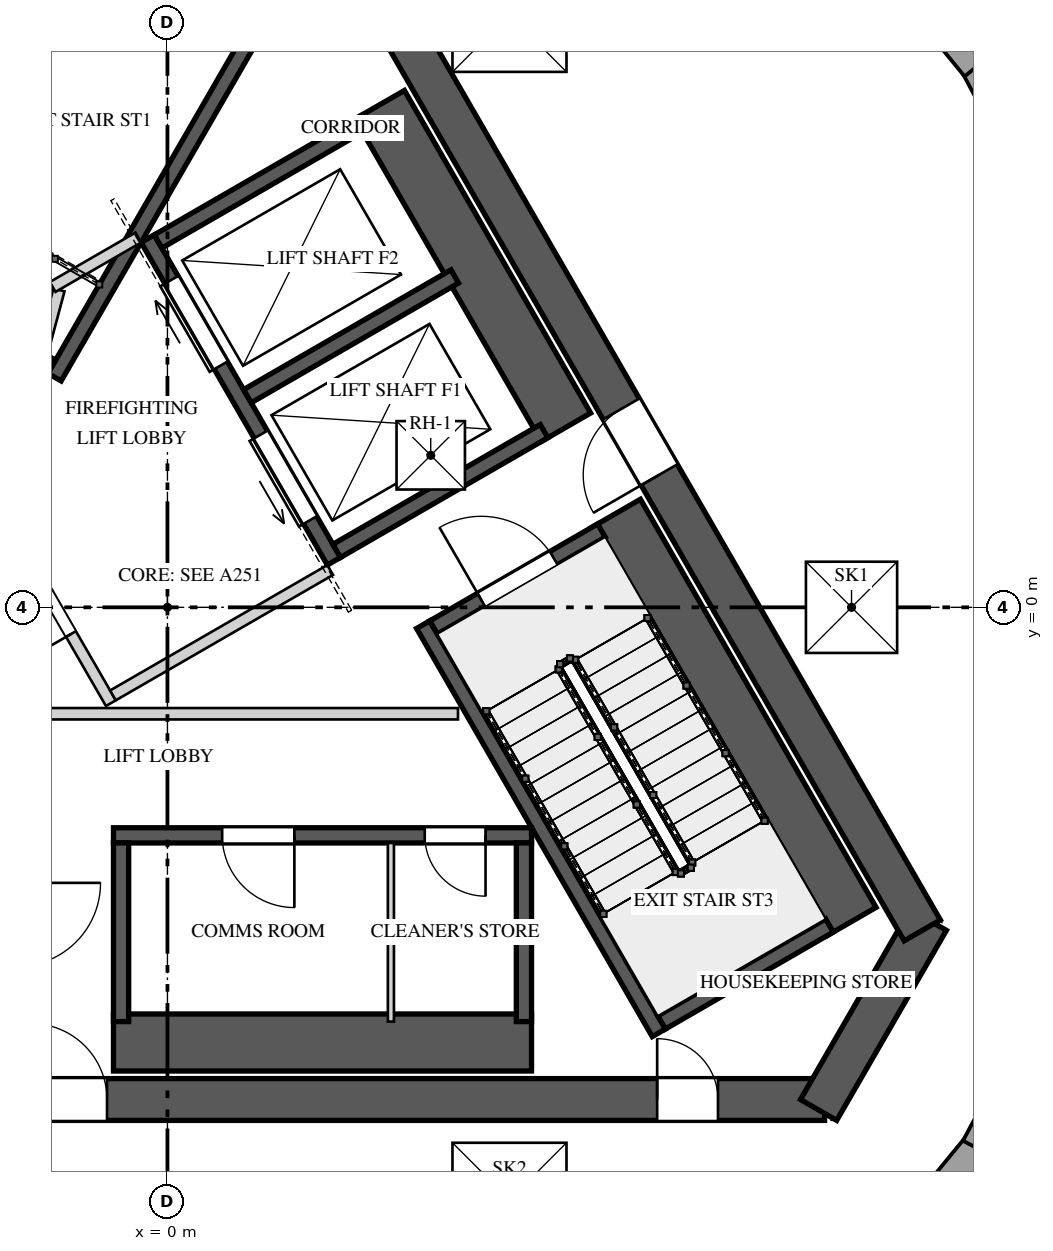
"""IFC4 building model, lengths in metres.
Left out: names, types, materials, properties, quantities, classifications, styles, units other than length and angle.
Written with IfcOpenShell. Run it as: python <this file> out.ifc"""

import sys

from ifc_helpers import new_model, si_unit, direction, frame, frame_2d, origin, origin_2d, place, context, subcontext, project, spatial, rectangle, extrude, element, fill, save


model = new_model("IFC4")
c1 = context("Model", 3, precision=1e-05, world=origin(), true_north=direction((0.0, 1.0)))
c2 = subcontext(c1, "Body", "Model", "MODEL_VIEW")
j1 = project(units=[si_unit("LENGTHUNIT", "METRE"), si_unit("PLANEANGLEUNIT", "RADIAN")], contexts=[c1])
p1 = place(None, origin())
s1 = spatial("IfcSite", under=j1, at=p1, CompositionType="ELEMENT")
p2 = place(p1, origin())
s2 = spatial("IfcBuilding", under=s1, at=p2, CompositionType="ELEMENT")
p3 = place(p2, frame((0.0, 0.0, 380.9)))
s3 = spatial("IfcBuildingStorey", under=s2, at=p3, CompositionType="ELEMENT", Elevation=380.9)
p4 = place(p3, frame((-1.285, 10.725, 0.0), z_axis=(0.0, 0.0, 1.0), x_axis=(-0.499994590896, -0.86602852671, 0.0)))
e1 = element("IfcWall", 1, at=p4, inside=s3, PredefinedType="SHEAR", context=c2, shape_type="SweptSolid", body=[
    extrude(rectangle(XDim=17.292, YDim=0.55, at=frame_2d((8.646, 0.0))), origin(), (0.0, 0.0, 1.0), 11.65),
])
p5 = place(p4, frame((6.851, 0.0, 0.0)))
e2 = element("IfcOpeningElement", 2, at=p5, cuts=e1, PredefinedType="OPENING", context=c2, shape_type="SweptSolid", body=[
    extrude(rectangle(XDim=1.0, YDim=2.4, at=frame_2d((0.5, 1.2))), frame((0.0, 0.285, 0.0), z_axis=(0.0, -1.0, 0.0), x_axis=(1.0, 0.0, 0.0)), (0.0, 0.0, 1.0), 0.57),
])
p6 = place(p3, frame((-8.646, -6.475, 0.0), z_axis=(0.0, 0.0, 1.0), x_axis=(1.0, 0.0, 0.0)))
e3 = element("IfcWall", 3, at=p6, inside=s3, PredefinedType="SHEAR", context=c2, shape_type="SweptSolid", body=[
    extrude(rectangle(XDim=17.292, YDim=0.55, at=frame_2d((8.646, 0.0))), origin(), (0.0, 0.0, 1.0), 11.65),
])
p7 = place(p6, frame((6.851, 0.0, 0.0)))
e4 = element("IfcOpeningElement", 4, at=p7, cuts=e3, PredefinedType="OPENING", context=c2, shape_type="SweptSolid", body=[
    extrude(rectangle(XDim=1.0, YDim=2.4, at=frame_2d((0.5, 1.2))), frame((0.0, 0.285, 0.0), z_axis=(0.0, -1.0, 0.0), x_axis=(1.0, 0.0, 0.0)), (0.0, 0.0, 1.0), 0.57),
])
p8 = place(p6, frame((15.089, 0.0, 0.0)))
e5 = element("IfcOpeningElement", 5, at=p8, cuts=e3, PredefinedType="OPENING", context=c2, shape_type="SweptSolid", body=[
    extrude(rectangle(XDim=0.8, YDim=2.1, at=frame_2d((0.4, 1.05))), frame((0.0, 0.285, 0.0), z_axis=(0.0, -1.0, 0.0), x_axis=(1.0, 0.0, 0.0)), (0.0, 0.0, 1.0), 0.57),
])
p9 = place(p3, frame((8.566, -6.613, 0.0), z_axis=(0.0, 0.0, 1.0), x_axis=(0.499995765644, 0.866027848477, 0.0)))
e6 = element("IfcWall", 6, at=p9, inside=s3, PredefinedType="SHEAR", context=c2, shape_type="SweptSolid", body=[
    extrude(rectangle(XDim=2.887, YDim=0.55, at=frame_2d((1.443, 0.0))), origin(), (0.0, 0.0, 1.0), 11.65),
])
p10 = place(p3, frame((9.93, -4.25, 0.0), z_axis=(0.0, 0.0, 1.0), x_axis=(-0.499994590896, 0.86602852671, 0.0)))
e7 = element("IfcWall", 7, at=p10, inside=s3, PredefinedType="SHEAR", context=c2, shape_type="SweptSolid", body=[
    extrude(rectangle(XDim=17.292, YDim=0.55, at=frame_2d((8.646, 0.0))), origin(), (0.0, 0.0, 1.0), 11.65),
])
p11 = place(p10, frame((6.921, 0.0, 0.0)))
e8 = element("IfcOpeningElement", 8, at=p11, cuts=e7, PredefinedType="OPENING", context=c2, shape_type="SweptSolid", body=[
    extrude(rectangle(XDim=1.0, YDim=2.4, at=frame_2d((0.5, 1.2))), frame((0.0, 0.285, 0.0), z_axis=(0.0, -1.0, 0.0), x_axis=(1.0, 0.0, 0.0)), (0.0, 0.0, 1.0), 0.57),
])
p12 = place(p10, frame((14.626, 0.0, 0.0)))
e9 = element("IfcOpeningElement", 9, at=p12, cuts=e7, PredefinedType="OPENING", context=c2, shape_type="SweptSolid", body=[
    extrude(rectangle(XDim=0.8, YDim=2.1, at=frame_2d((0.4, 1.05))), frame((0.0, 0.285, 0.0), z_axis=(0.0, -1.0, 0.0), x_axis=(1.0, 0.0, 0.0)), (0.0, 0.0, 1.0), 0.57),
])
p13 = place(p3, frame((11.826, 4.898, 0.0), z_axis=(0.0, 0.0, 1.0), x_axis=(-0.47141481613, 0.881911600521, 0.0)))
e10 = element("IfcWall", 10, at=p13, inside=s3, PredefinedType="SOLIDWALL", context=c2, shape_type="SweptSolid", body=[
    extrude(rectangle(XDim=2.529, YDim=0.4, at=frame_2d((1.264, 0.0))), origin(), (0.0, 0.0, 1.0), 11.65),
])
p14 = place(p13, frame((0.665, 0.0, 1.5)))
e11 = element("IfcOpeningElement", 11, at=p14, cuts=e10, PredefinedType="OPENING", context=c2, shape_type="SweptSolid", body=[
    extrude(rectangle(XDim=1.2, YDim=8.0, at=frame_2d((0.6, 4.0))), frame((0.0, 0.21, 0.0), z_axis=(0.0, -1.0, 0.0), x_axis=(1.0, 0.0, 0.0)), (0.0, 0.0, 1.0), 0.42),
])
p15 = place(p3, frame((10.643, 7.111, 0.0), z_axis=(0.0, 0.0, 1.0), x_axis=(-0.634383184074, 0.773018742182, 0.0)))
e12 = element("IfcWall", 12, at=p15, inside=s3, PredefinedType="SOLIDWALL", context=c2, shape_type="SweptSolid", body=[
    extrude(rectangle(XDim=2.529, YDim=0.4, at=frame_2d((1.264, 0.0))), origin(), (0.0, 0.0, 1.0), 11.65),
])
p16 = place(p3, frame((9.051, -9.051, 0.0), z_axis=(0.0, 0.0, 1.0), x_axis=(0.634383184074, 0.773018742182, 0.0)))
e13 = element("IfcWall", 13, at=p16, inside=s3, PredefinedType="SOLIDWALL", context=c2, shape_type="SweptSolid", body=[
    extrude(rectangle(XDim=2.529, YDim=0.4, at=frame_2d((1.264, 0.0))), origin(), (0.0, 0.0, 1.0), 11.65),
])
p17 = place(p16, frame((0.665, 0.0, 1.5)))
e14 = element("IfcOpeningElement", 14, at=p17, cuts=e13, PredefinedType="OPENING", context=c2, shape_type="SweptSolid", body=[
    extrude(rectangle(XDim=1.2, YDim=5.0, at=frame_2d((0.6, 2.5))), frame((0.0, 0.21, 0.0), z_axis=(0.0, -1.0, 0.0), x_axis=(1.0, 0.0, 0.0)), (0.0, 0.0, 1.0), 0.42),
])
p18 = place(p3, frame((10.643, -7.111, 0.0), z_axis=(0.0, 0.0, 1.0), x_axis=(0.47137468207, 0.881933052507, 0.0)))
e15 = element("IfcWall", 15, at=p18, inside=s3, PredefinedType="SOLIDWALL", context=c2, shape_type="SweptSolid", body=[
    extrude(rectangle(XDim=2.529, YDim=0.4, at=frame_2d((1.265, 0.0))), origin(), (0.0, 0.0, 1.0), 11.65),
])
p19 = place(p3, frame((-24.801, 5.463, 0.0), z_axis=(0.0, 0.0, 1.0), x_axis=(0.669133322061, -0.74314238024, 0.0)))
e16 = element("IfcWall", 16, at=p19, inside=s3, PredefinedType="PARAPET", context=c2, shape_type="SweptSolid", body=[
    extrude(rectangle(XDim=41.439, YDim=0.45, at=frame_2d((20.72, 0.0))), origin(), (0.0, 0.0, 1.0), 1.2),
])
p20 = place(p3, frame((7.669, -24.209, 0.0), z_axis=(0.0, 0.0, 1.0), x_axis=(0.309016265785, 0.951056753028, 0.0)))
e17 = element("IfcWall", 17, at=p20, inside=s3, PredefinedType="PARAPET", context=c2, shape_type="SweptSolid", body=[
    extrude(rectangle(XDim=41.439, YDim=0.45, at=frame_2d((20.72, 0.0))), origin(), (0.0, 0.0, 1.0), 1.2),
])
p21 = place(p3, frame((-0.918, 9.86, 0.0), z_axis=(0.0, 0.0, 1.0), x_axis=(-0.500026960575, -0.86600983753, 0.0)))
e18 = element("IfcWall", 18, at=p21, inside=s3, PredefinedType="SOLIDWALL", context=c2, shape_type="SweptSolid", body=[
    extrude(rectangle(XDim=6.2, YDim=0.75, at=frame_2d((3.1, 0.0))), origin(), (0.0, 0.0, 1.0), 11.65),
])
p22 = place(p3, frame((1.615, 8.397, 0.0), z_axis=(0.0, 0.0, 1.0), x_axis=(-0.500009909098, -0.866019682689, 0.0)))
e19 = element("IfcWall", 19, at=p22, inside=s3, PredefinedType="SOLIDWALL", context=c2, shape_type="SweptSolid", body=[
    extrude(rectangle(XDim=6.2, YDim=0.2, at=frame_2d((3.1, 0.0))), origin(), (0.0, 0.0, 1.0), 11.65),
])
p23 = place(p3, frame((-1.521, 3.165, 0.0), z_axis=(0.0, 0.0, 1.0), x_axis=(-0.866030925526, 0.499990435942, 0.0)))
e20 = element("IfcWall", 20, at=p23, inside=s3, PredefinedType="SOLIDWALL", context=c2, shape_type="SweptSolid", body=[
    extrude(rectangle(XDim=2.55, YDim=0.2, at=frame_2d((1.275, 0.0))), origin(), (0.0, 0.0, 1.0), 11.65),
])
p24 = place(p23, frame((0.725, 0.0, 0.0)))
e21 = element("IfcOpeningElement", 21, at=p24, cuts=e20, PredefinedType="OPENING", context=c2, shape_type="SweptSolid", body=[
    extrude(rectangle(XDim=1.1, YDim=2.4, at=frame_2d((0.55, 1.2))), frame((0.0, 0.11, 0.0), z_axis=(0.0, -1.0, 0.0), x_axis=(1.0, 0.0, 0.0)), (0.0, 0.0, 1.0), 0.22),
])
p25 = place(p3, frame((8.998, -4.135, 0.0), z_axis=(0.0, 0.0, 1.0), x_axis=(-0.500009909098, 0.866019682689, 0.0)))
e22 = element("IfcWall", 22, at=p25, inside=s3, PredefinedType="SOLIDWALL", context=c2, shape_type="SweptSolid", body=[
    extrude(rectangle(XDim=6.2, YDim=0.75, at=frame_2d((3.1, 0.0))), origin(), (0.0, 0.0, 1.0), 11.65),
])
p26 = place(p3, frame((6.465, -5.597, 0.0), z_axis=(0.0, 0.0, 1.0), x_axis=(-0.49998037582, 0.866036733513, 0.0)))
e23 = element("IfcWall", 23, at=p26, inside=s3, PredefinedType="SOLIDWALL", context=c2, shape_type="SweptSolid", body=[
    extrude(rectangle(XDim=6.2, YDim=0.2, at=frame_2d((3.1, 0.0))), origin(), (0.0, 0.0, 1.0), 11.65),
])
p27 = place(p3, frame((6.501, -5.461, 0.0), z_axis=(0.0, 0.0, 1.0), x_axis=(0.865989465428, 0.500062241894, 0.0)))
e24 = element("IfcWall", 24, at=p27, inside=s3, PredefinedType="SOLIDWALL", context=c2, shape_type="SweptSolid", body=[
    extrude(rectangle(XDim=2.55, YDim=0.2, at=frame_2d((1.275, 0.0))), origin(), (0.0, 0.0, 1.0), 11.65),
])
p28 = place(p3, frame((3.501, -0.265, 0.0), z_axis=(0.0, 0.0, 1.0), x_axis=(0.866030925526, 0.499990435942, 0.0)))
e25 = element("IfcWall", 25, at=p28, inside=s3, PredefinedType="SOLIDWALL", context=c2, shape_type="SweptSolid", body=[
    extrude(rectangle(XDim=2.55, YDim=0.2, at=frame_2d((1.275, 0.0))), origin(), (0.0, 0.0, 1.0), 11.65),
])
p29 = place(p28, frame((0.725, 0.0, 0.0)))
e26 = element("IfcOpeningElement", 26, at=p29, cuts=e25, PredefinedType="OPENING", context=c2, shape_type="SweptSolid", body=[
    extrude(rectangle(XDim=1.1, YDim=2.4, at=frame_2d((0.55, 1.2))), frame((0.0, 0.11, 0.0), z_axis=(0.0, -1.0, 0.0), x_axis=(1.0, 0.0, 0.0)), (0.0, 0.0, 1.0), 0.22),
])
p30 = place(p3, frame((4.79, -3.0, 0.0), z_axis=(0.0, 0.0, 1.0), x_axis=(-1.0, 0.0, 0.0)))
e27 = element("IfcWall", 27, at=p30, inside=s3, PredefinedType="SOLIDWALL", context=c2, shape_type="SweptSolid", body=[
    extrude(rectangle(XDim=5.5, YDim=0.2, at=frame_2d((2.75, 0.0))), origin(), (0.0, 0.0, 1.0), 11.65),
])
p31 = place(p30, frame((3.12, 0.0, 0.0)))
e28 = element("IfcOpeningElement", 28, at=p31, cuts=e27, PredefinedType="OPENING", context=c2, shape_type="SweptSolid", body=[
    extrude(rectangle(XDim=0.95, YDim=2.4, at=frame_2d((0.475, 1.2))), frame((0.0, 0.11, 0.0), z_axis=(0.0, -1.0, 0.0), x_axis=(1.0, 0.0, 0.0)), (0.0, 0.0, 1.0), 0.22),
])
p32 = place(p30, frame((0.605, 0.0, 0.0)))
e29 = element("IfcOpeningElement", 29, at=p32, cuts=e27, PredefinedType="OPENING", context=c2, shape_type="SweptSolid", body=[
    extrude(rectangle(XDim=0.8, YDim=2.1, at=frame_2d((0.4, 1.05))), frame((0.0, 0.11, 0.0), z_axis=(0.0, -1.0, 0.0), x_axis=(1.0, 0.0, 0.0)), (0.0, 0.0, 1.0), 0.22),
])
p33 = place(p3, frame((-0.71, -5.725, 0.0), z_axis=(0.0, 0.0, 1.0), x_axis=(1.0, 0.0, 0.0)))
e30 = element("IfcWall", 30, at=p33, inside=s3, PredefinedType="SOLIDWALL", context=c2, shape_type="SweptSolid", body=[
    extrude(rectangle(XDim=5.5, YDim=0.75, at=frame_2d((2.75, 0.0))), origin(), (0.0, 0.0, 1.0), 11.65),
])
for number, where, z_axis, x_axis in (
    (31, (-0.61, -3.1, 0.0), (0.0, 0.0, 1.0), (0.0, -1.0, 0.0)),
    (32, (4.69, -3.1, 0.0), (0.0, 0.0, 1.0), (0.0, -1.0, 0.0)),
):
    element("IfcWall", number, at=place(p3, frame(where, z_axis=z_axis, x_axis=x_axis)), inside=s3, PredefinedType="SOLIDWALL", context=c2, shape_type="SweptSolid", body=[
        extrude(rectangle(XDim=2.35, YDim=0.2, at=frame_2d((1.175, 0.0))), origin(), (0.0, 0.0, 1.0), 11.65),
    ])
p34 = place(p3, frame((2.94, -3.1, 0.0), z_axis=(0.0, 0.0, 1.0), x_axis=(0.0, -1.0, 0.0)))
e33 = element("IfcWall", 33, at=p34, inside=s3, PredefinedType="PARTITIONING", context=c2, shape_type="SweptSolid", body=[
    extrude(rectangle(XDim=2.35, YDim=0.08, at=frame_2d((1.175, 0.0))), origin(), (0.0, 0.0, 1.0), 11.65),
])
p35 = place(p3, frame((2.19, 0.606, 0.0), z_axis=(0.0, 0.0, 1.0), x_axis=(-0.500002801628, 0.866023786258, 0.0)))
e34 = element("IfcWall", 34, at=p35, inside=s3, PredefinedType="SOLIDWALL", context=c2, shape_type="SweptSolid", body=[
    extrude(rectangle(XDim=4.9, YDim=0.2, at=frame_2d((2.45, 0.0))), origin(), (0.0, 0.0, 1.0), 11.65),
])
p36 = place(p35, frame((0.625, 0.0, 0.0)))
e35 = element("IfcOpeningElement", 35, at=p36, cuts=e34, PredefinedType="OPENING", context=c2, shape_type="SweptSolid", body=[
    extrude(rectangle(XDim=1.3, YDim=2.1, at=frame_2d((0.65, 1.05))), frame((0.0, 0.11, 0.0), z_axis=(0.0, -1.0, 0.0), x_axis=(1.0, 0.0, 0.0)), (0.0, 0.0, 1.0), 0.22),
])
p37 = place(p35, frame((2.975, 0.0, 0.0)))
e36 = element("IfcOpeningElement", 36, at=p37, cuts=e34, PredefinedType="OPENING", context=c2, shape_type="SweptSolid", body=[
    extrude(rectangle(XDim=1.3, YDim=2.1, at=frame_2d((0.65, 1.05))), frame((0.0, 0.11, 0.0), z_axis=(0.0, -1.0, 0.0), x_axis=(1.0, 0.0, 0.0)), (0.0, 0.0, 1.0), 0.22),
])
p38 = place(p3, frame((5.243, 2.369, 0.0), z_axis=(0.0, 0.0, 1.0), x_axis=(-0.500002801628, 0.866023786258, 0.0)))
e37 = element("IfcWall", 37, at=p38, inside=s3, PredefinedType="SOLIDWALL", context=c2, shape_type="SweptSolid", body=[
    extrude(rectangle(XDim=4.9, YDim=0.75, at=frame_2d((2.45, 0.0))), origin(), (0.0, 0.0, 1.0), 11.65),
])
for number, where, z_axis, x_axis in (
    (38, (2.227, 0.743, 0.0), (0.0, 0.0, 1.0), (0.866, 0.5, 0.0)),
    (39, (1.052, 2.778, 0.0), (0.0, 0.0, 1.0), (0.866, 0.5, 0.0)),
    (40, (-0.123, 4.813, 0.0), (0.0, 0.0, 1.0), (0.866, 0.5, 0.0)),
):
    element("IfcWall", number, at=place(p3, frame(where, z_axis=z_axis, x_axis=x_axis)), inside=s3, PredefinedType="SOLIDWALL", context=c2, shape_type="SweptSolid", body=[
        extrude(rectangle(XDim=3.15, YDim=0.2, at=frame_2d((1.575, 0.0))), origin(), (0.0, 0.0, 1.0), 11.65),
    ])
p39 = place(p3, frame((-0.744, -1.261, 0.0), z_axis=(0.0, 0.0, 1.0), x_axis=(-0.500004234368, 0.866022959057, 0.0)))
e41 = element("IfcWall", 41, at=p39, inside=s3, PredefinedType="PARTITIONING", context=c2, shape_type="SweptSolid", body=[
    extrude(rectangle(XDim=3.125, YDim=0.15, at=frame_2d((1.562, 0.0))), origin(), (0.0, 0.0, 1.0), 11.65),
])
p40 = place(p39, frame((1.05, 0.0, 0.0)))
e42 = element("IfcOpeningElement", 42, at=p40, cuts=e41, PredefinedType="OPENING", context=c2, shape_type="SweptSolid", body=[
    extrude(rectangle(XDim=1.1, YDim=2.4, at=frame_2d((0.55, 1.2))), frame((0.0, 0.085, 0.0), z_axis=(0.0, -1.0, 0.0), x_axis=(1.0, 0.0, 0.0)), (0.0, 0.0, 1.0), 0.17),
])
p41 = place(p3, frame((-0.717, -1.159, 0.0), z_axis=(0.0, 0.0, 1.0), x_axis=(0.866008176907, 0.50002983664, 0.0)))
e43 = element("IfcWall", 43, at=p41, inside=s3, PredefinedType="PARTITIONING", context=c2, shape_type="SweptSolid", body=[
    extrude(rectangle(XDim=3.3, YDim=0.15, at=frame_2d((1.65, 0.0))), origin(), (0.0, 0.0, 1.0), 11.65),
])
p42 = place(p3, frame((-2.178, 1.372, 0.0), z_axis=(0.0, 0.0, 1.0), x_axis=(0.258808958833, 0.96592852884, 0.0)))
e44 = element("IfcWall", 44, at=p42, inside=s3, PredefinedType="PARTITIONING", context=c2, shape_type="SweptSolid", body=[
    extrude(rectangle(XDim=2.903, YDim=0.15, at=frame_2d((1.451, 0.0))), origin(), (0.0, 0.0, 1.0), 11.65),
])
p43 = place(p3, frame((-1.51, 4.215, 0.0), z_axis=(0.0, 0.0, 1.0), x_axis=(0.866085525409, 0.49989585183, 0.0)))
e45 = element("IfcWall", 45, at=p43, inside=s3, PredefinedType="PARTITIONING", context=c2, shape_type="SweptSolid", body=[
    extrude(rectangle(XDim=1.3, YDim=0.15, at=frame_2d((0.65, 0.0))), origin(), (0.0, 0.0, 1.0), 11.65),
])
p44 = place(p3, frame((-4.053, -1.4, 0.0), z_axis=(0.0, 0.0, 1.0), x_axis=(1.0, 0.0, 0.0)))
e46 = element("IfcWall", 46, at=p44, inside=s3, PredefinedType="PARTITIONING", context=c2, shape_type="SweptSolid", body=[
    extrude(rectangle(XDim=7.876, YDim=0.15, at=frame_2d((3.938, 0.0))), origin(), (0.0, 0.0, 1.0), 11.65),
])
p45 = place(p2, frame((0.0, 0.0, 392.9)))
p46 = place(p45, frame((-1.23, -2.9, 0.0), z_axis=(0.0, 0.0, 1.0), x_axis=(0.0, -1.0, 0.0)))
p47 = place(p46, frame((0.675, 0.0, 0.0)))
p48 = place(p47, origin())
e47 = element("IfcDoor", 47, at=p48, inside=s3, OperationType="DOUBLE_DOOR_SINGLE_SWING", PredefinedType="DOOR", context=c2, shape_type="SweptSolid", body=[
    extrude(rectangle(XDim=1.2, YDim=2.1, at=frame_2d((0.6, 1.05))), frame((0.0, 0.025, 0.0), z_axis=(0.0, -1.0, 0.0), x_axis=(1.0, 0.0, 0.0)), (0.0, 0.0, 1.0), 0.05),
])
p49 = place(p45, frame((3.126, 0.385, 0.0), z_axis=(0.0, 0.0, 1.0), x_axis=(0.866030925526, 0.499990435942, 0.0)))
p50 = place(p49, frame((0.675, 0.0, 0.0)))
p51 = place(p50, origin())
e48 = element("IfcDoor", 48, at=p51, inside=s3, OperationType="DOUBLE_DOOR_SINGLE_SWING", PredefinedType="DOOR", context=c2, shape_type="SweptSolid", body=[
    extrude(rectangle(XDim=1.2, YDim=2.1, at=frame_2d((0.6, 1.05))), frame((0.0, 0.025, 0.0), z_axis=(0.0, -1.0, 0.0), x_axis=(1.0, 0.0, 0.0)), (0.0, 0.0, 1.0), 0.05),
])
p52 = place(p45, frame((0.0, 0.0, -0.35)))
p53 = place(p52, frame((9.0, 0.0, 0.0)))
p54 = place(p53, frame((0.0, 0.0, 0.3)))
e49 = element("IfcWindow", 49, at=p54, inside=s3, PartitioningType="SINGLE_PANEL", PredefinedType="SKYLIGHT", context=c2, shape_type="SweptSolid", body=[
    extrude(rectangle(XDim=1.2, YDim=1.2, at=origin_2d()), origin(), (0.0, 0.0, 1.0), 0.05),
])
p55 = place(p52, frame((4.5, 7.794, 0.0)))
p56 = place(p55, frame((0.0, 0.0, 0.3)))
e50 = element("IfcWindow", 50, at=p56, inside=s3, PartitioningType="SINGLE_PANEL", PredefinedType="SKYLIGHT", context=c2, shape_type="SweptSolid", body=[
    extrude(rectangle(XDim=1.5, YDim=1.5, at=origin_2d()), origin(), (0.0, 0.0, 1.0), 0.05),
])
p57 = place(p52, frame((4.5, -7.794, 0.0)))
p58 = place(p57, frame((0.0, 0.0, 0.3)))
e51 = element("IfcWindow", 51, at=p58, inside=s3, PartitioningType="SINGLE_PANEL", PredefinedType="SKYLIGHT", context=c2, shape_type="SweptSolid", body=[
    extrude(rectangle(XDim=1.5, YDim=1.5, at=origin_2d()), origin(), (0.0, 0.0, 1.0), 0.05),
])
p59 = place(p52, frame((3.464, 2.0, 0.0)))
p60 = place(p59, frame((0.0, 0.0, 0.35)))
e52 = element("IfcDoor", 52, at=p60, inside=s3, OperationType="SINGLE_SWING_LEFT", PredefinedType="TRAPDOOR", context=c2, shape_type="SweptSolid", body=[
    extrude(rectangle(XDim=0.9, YDim=0.9, at=origin_2d()), origin(), (0.0, 0.0, 1.0), 0.05),
])
p61 = place(p29, origin())
e53 = element("IfcDoor", 53, at=p61, inside=s3, OperationType="SINGLE_SWING_RIGHT", PredefinedType="DOOR", context=c2, shape_type="SweptSolid", body=[
    extrude(rectangle(XDim=1.1, YDim=2.4, at=frame_2d((0.55, 1.2))), frame((0.0, 0.025, 0.0), z_axis=(0.0, -1.0, 0.0), x_axis=(1.0, 0.0, 0.0)), (0.0, 0.0, 1.0), 0.05),
])
fill(e26, e53)
p62 = place(p31, origin())
e54 = element("IfcDoor", 54, at=p62, inside=s3, OperationType="SINGLE_SWING_LEFT", PredefinedType="DOOR", context=c2, shape_type="SweptSolid", body=[
    extrude(rectangle(XDim=0.95, YDim=2.4, at=frame_2d((0.475, 1.2))), frame((0.0, 0.025, 0.0), z_axis=(0.0, -1.0, 0.0), x_axis=(1.0, 0.0, 0.0)), (0.0, 0.0, 1.0), 0.05),
])
fill(e28, e54)
p63 = place(p32, origin())
e55 = element("IfcDoor", 55, at=p63, inside=s3, OperationType="SINGLE_SWING_RIGHT", PredefinedType="DOOR", context=c2, shape_type="SweptSolid", body=[
    extrude(rectangle(XDim=0.8, YDim=2.1, at=frame_2d((0.4, 1.05))), frame((0.0, 0.025, 0.0), z_axis=(0.0, -1.0, 0.0), x_axis=(1.0, 0.0, 0.0)), (0.0, 0.0, 1.0), 0.05),
])
fill(e29, e55)
p64 = place(p36, origin())
e56 = element("IfcDoor", 56, at=p64, inside=s3, OperationType="SLIDING_TO_LEFT", PredefinedType="DOOR", context=c2, shape_type="SweptSolid", body=[
    extrude(rectangle(XDim=1.3, YDim=2.1, at=frame_2d((0.65, 1.05))), frame((0.0, 0.025, 0.0), z_axis=(0.0, -1.0, 0.0), x_axis=(1.0, 0.0, 0.0)), (0.0, 0.0, 1.0), 0.05),
])
fill(e35, e56)
p65 = place(p37, origin())
e57 = element("IfcDoor", 57, at=p65, inside=s3, OperationType="SLIDING_TO_RIGHT", PredefinedType="DOOR", context=c2, shape_type="SweptSolid", body=[
    extrude(rectangle(XDim=1.3, YDim=2.1, at=frame_2d((0.65, 1.05))), frame((0.0, 0.025, 0.0), z_axis=(0.0, -1.0, 0.0), x_axis=(1.0, 0.0, 0.0)), (0.0, 0.0, 1.0), 0.05),
])
fill(e36, e57)
p66 = place(p40, origin())
e58 = element("IfcDoor", 58, at=p66, inside=s3, OperationType="SINGLE_SWING_LEFT", PredefinedType="DOOR", context=c2, shape_type="SweptSolid", body=[
    extrude(rectangle(XDim=1.1, YDim=2.4, at=frame_2d((0.55, 1.2))), frame((0.0, 0.025, 0.0), z_axis=(0.0, -1.0, 0.0), x_axis=(1.0, 0.0, 0.0)), (0.0, 0.0, 1.0), 0.05),
])
fill(e42, e58)
p67 = place(p7, origin())
e59 = element("IfcDoor", 59, at=p67, inside=s3, OperationType="SINGLE_SWING_LEFT", PredefinedType="DOOR", context=c2, shape_type="SweptSolid", body=[
    extrude(rectangle(XDim=1.0, YDim=2.4, at=frame_2d((0.5, 1.2))), frame((0.0, 0.025, 0.0), z_axis=(0.0, -1.0, 0.0), x_axis=(1.0, 0.0, 0.0)), (0.0, 0.0, 1.0), 0.05),
])
fill(e4, e59)
p68 = place(p11, origin())
e60 = element("IfcDoor", 60, at=p68, inside=s3, OperationType="SINGLE_SWING_RIGHT", PredefinedType="DOOR", context=c2, shape_type="SweptSolid", body=[
    extrude(rectangle(XDim=1.0, YDim=2.4, at=frame_2d((0.5, 1.2))), frame((0.0, 0.025, 0.0), z_axis=(0.0, -1.0, 0.0), x_axis=(1.0, 0.0, 0.0)), (0.0, 0.0, 1.0), 0.05),
])
fill(e8, e60)
p69 = place(p8, origin())
e61 = element("IfcDoor", 61, at=p69, inside=s3, OperationType="SINGLE_SWING_LEFT", PredefinedType="DOOR", context=c2, shape_type="SweptSolid", body=[
    extrude(rectangle(XDim=0.8, YDim=2.1, at=frame_2d((0.4, 1.05))), frame((0.0, 0.025, 0.0), z_axis=(0.0, -1.0, 0.0), x_axis=(1.0, 0.0, 0.0)), (0.0, 0.0, 1.0), 0.05),
])
fill(e5, e61)
save(model, sys.argv[1])
